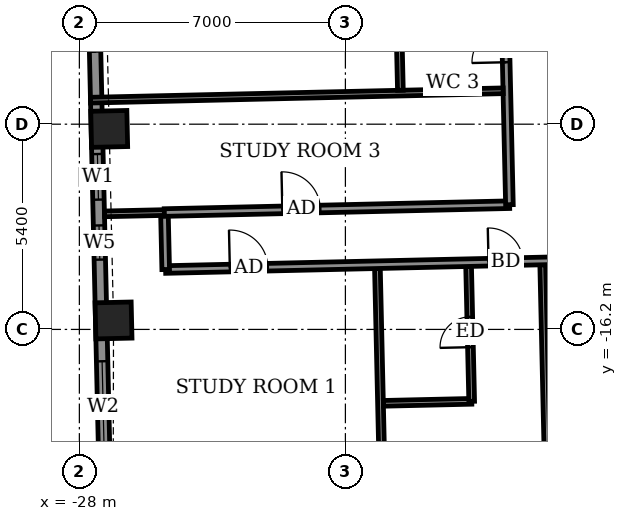
"""IFC4 building model, lengths in metres.
Left out: names, types, materials, properties, quantities, classifications, styles, units other than length and angle.
Written with IfcOpenShell. Run it as: python <this file> out.ifc"""

import sys

from ifc_helpers import new_model, si_unit, direction, frame, frame_2d, origin, origin_2d, place, context, subcontext, project, spatial, rectangle, extrude, element, fill, save


model = new_model("IFC4")
c1 = context("Model", 3, precision=1e-05, world=origin(), true_north=direction((0.0, 1.0)))
c2 = subcontext(c1, "Body", "Model", "MODEL_VIEW")
j1 = project(units=[si_unit("LENGTHUNIT", "METRE"), si_unit("PLANEANGLEUNIT", "RADIAN")], contexts=[c1])
p1 = place(None, origin())
s1 = spatial("IfcSite", under=j1, at=p1, CompositionType="ELEMENT")
p2 = place(p1, origin())
s2 = spatial("IfcBuilding", under=s1, at=p2, CompositionType="ELEMENT")
p3 = place(p2, frame((0.0, 0.0, 290.7)))
s3 = spatial("IfcBuildingStorey", under=s2, at=p3, CompositionType="ELEMENT", Elevation=290.7)
for number, where, z_axis, x_axis in (
    (1, (-27.215, -10.924, -0.55), (0.0, 0.0, 1.0), (0.023, -1.0, 0.0)),
    (2, (-27.101, -15.964, -0.55), (0.0, 0.0, 1.0), (0.023, -1.0, 0.0)),
):
    element("IfcColumn", number, at=place(p3, frame(where, z_axis=z_axis, x_axis=x_axis)), inside=s3, PredefinedType="COLUMN", context=c2, shape_type="SweptSolid", body=[
        extrude(rectangle(XDim=0.95, YDim=0.95, at=origin_2d()), origin(), (0.0, 0.0, 1.0), 3.6),
    ])
p4 = place(p3, frame((-27.665, -5.416, 0.0), z_axis=(0.0, 0.0, 1.0), x_axis=(0.022660024814, -0.999743228672, 0.0)))
e3 = element("IfcWall", 3, at=p4, inside=s3, PredefinedType="SOLIDWALL", context=c2, shape_type="SweptSolid", body=[
    extrude(rectangle(XDim=15.45, YDim=0.3, at=frame_2d((7.725, 0.0))), origin(), (0.0, 0.0, 1.0), 2.55),
])
p5 = place(p4, frame((1.975, 0.0, 0.0)))
e4 = element("IfcOpeningElement", 4, at=p5, cuts=e3, PredefinedType="OPENING", context=c2, shape_type="SweptSolid", body=[
    extrude(rectangle(XDim=1.5, YDim=2.4, at=frame_2d((0.75, 1.2))), frame((0.0, 0.16, 0.0), z_axis=(0.0, -1.0, 0.0), x_axis=(1.0, 0.0, 0.0)), (0.0, 0.0, 1.0), 0.32),
])
p6 = place(p4, frame((6.171, 0.0, 0.9)))
e5 = element("IfcOpeningElement", 5, at=p6, cuts=e3, PredefinedType="OPENING", context=c2, shape_type="SweptSolid", body=[
    extrude(rectangle(XDim=1.2, YDim=1.5, at=frame_2d((0.6, 0.75))), frame((0.0, 0.16, 0.0), z_axis=(0.0, -1.0, 0.0), x_axis=(1.0, 0.0, 0.0)), (0.0, 0.0, 1.0), 0.32),
])
p7 = place(p4, frame((8.05, 0.0, 0.9)))
e6 = element("IfcOpeningElement", 6, at=p7, cuts=e3, PredefinedType="OPENING", context=c2, shape_type="SweptSolid", body=[
    extrude(rectangle(XDim=0.9, YDim=1.5, at=frame_2d((0.45, 0.75))), frame((0.0, 0.16, 0.0), z_axis=(0.0, -1.0, 0.0), x_axis=(1.0, 0.0, 0.0)), (0.0, 0.0, 1.0), 0.32),
])
p8 = place(p4, frame((11.625, 0.0, 0.9)))
e7 = element("IfcOpeningElement", 7, at=p8, cuts=e3, PredefinedType="OPENING", context=c2, shape_type="SweptSolid", body=[
    extrude(rectangle(XDim=2.4, YDim=1.5, at=frame_2d((1.2, 0.75))), frame((0.0, 0.16, 0.0), z_axis=(0.0, -1.0, 0.0), x_axis=(1.0, 0.0, 0.0)), (0.0, 0.0, 1.0), 0.32),
])
p9 = place(p3, frame((-19.922, -24.945, 0.0), z_axis=(0.0, 0.0, 1.0), x_axis=(-0.022692470342, 0.99974249274, 0.0)))
e8 = element("IfcWall", 8, at=p9, inside=s3, PredefinedType="PARTITIONING", context=c2, shape_type="SweptSolid", body=[
    extrude(rectangle(XDim=10.35, YDim=0.15, at=frame_2d((5.175, 0.0))), origin(), (0.0, 0.0, 1.0), 2.55),
])
p10 = place(p3, frame((-15.573, -24.847, 0.0), z_axis=(0.0, 0.0, 1.0), x_axis=(-0.022714440015, 0.999741993824, 0.0)))
e9 = element("IfcWall", 9, at=p10, inside=s3, PredefinedType="PARTITIONING", context=c2, shape_type="SweptSolid", body=[
    extrude(rectangle(XDim=10.351, YDim=0.15, at=frame_2d((5.175, 0.0))), origin(), (0.0, 0.0, 1.0), 3.05),
])
p11 = place(p3, frame((-19.999, -18.145, 0.0), z_axis=(0.0, 0.0, 1.0), x_axis=(0.999740260747, 0.02279059109, 0.0)))
e10 = element("IfcWall", 10, at=p11, inside=s3, PredefinedType="PARTITIONING", context=c2, shape_type="SweptSolid", body=[
    extrude(rectangle(XDim=2.324, YDim=0.15, at=frame_2d((1.162, 0.0))), origin(), (0.0, 0.0, 1.0), 3.05),
])
p12 = place(p3, frame((-17.677, -18.092, 0.0), z_axis=(0.0, 0.0, 1.0), x_axis=(-0.022832321005, 0.999739308579, 0.0)))
e11 = element("IfcWall", 11, at=p12, inside=s3, PredefinedType="PARTITIONING", context=c2, shape_type="SweptSolid", body=[
    extrude(rectangle(XDim=3.55, YDim=0.15, at=frame_2d((1.775, 0.0))), origin(), (0.0, 0.0, 1.0), 3.05),
])
p13 = place(p12, frame((1.425, 0.0, 0.0)))
e12 = element("IfcOpeningElement", 12, at=p13, cuts=e11, PredefinedType="OPENING", context=c2, shape_type="SweptSolid", body=[
    extrude(rectangle(XDim=0.8, YDim=2.1, at=frame_2d((0.4, 1.05))), frame((0.0, 0.085, 0.0), z_axis=(0.0, -1.0, 0.0), x_axis=(1.0, 0.0, 0.0)), (0.0, 0.0, 1.0), 0.17),
])
p14 = place(p3, frame((-25.731, -14.624, 0.0), z_axis=(0.0, 0.0, 1.0), x_axis=(0.999742799525, 0.022678950563, 0.0)))
e13 = element("IfcWall", 13, at=p14, inside=s3, PredefinedType="PARTITIONING", context=c2, shape_type="SweptSolid", body=[
    extrude(rectangle(XDim=55.386, YDim=0.2, at=frame_2d((27.693, 0.0))), origin(), (0.0, 0.0, 1.0), 3.05),
])
p15 = place(p14, frame((1.691, 0.0, 0.0)))
e14 = element("IfcOpeningElement", 14, at=p15, cuts=e13, PredefinedType="OPENING", context=c2, shape_type="SweptSolid", body=[
    extrude(rectangle(XDim=1.0, YDim=2.1, at=frame_2d((0.5, 1.05))), frame((0.0, 0.11, 0.0), z_axis=(0.0, -1.0, 0.0), x_axis=(1.0, 0.0, 0.0)), (0.0, 0.0, 1.0), 0.22),
])
p16 = place(p14, frame((8.5, 0.0, 0.0)))
e15 = element("IfcOpeningElement", 15, at=p16, cuts=e13, PredefinedType="OPENING", context=c2, shape_type="SweptSolid", body=[
    extrude(rectangle(XDim=0.9, YDim=2.1, at=frame_2d((0.45, 1.05))), frame((0.0, 0.11, 0.0), z_axis=(0.0, -1.0, 0.0), x_axis=(1.0, 0.0, 0.0)), (0.0, 0.0, 1.0), 0.22),
])
p17 = place(p14, frame((10.5, 0.0, 0.0)))
e16 = element("IfcOpeningElement", 16, at=p17, cuts=e13, PredefinedType="OPENING", context=c2, shape_type="SweptSolid", body=[
    extrude(rectangle(XDim=0.9, YDim=2.1, at=frame_2d((0.45, 1.05))), frame((0.0, 0.11, 0.0), z_axis=(0.0, -1.0, 0.0), x_axis=(1.0, 0.0, 0.0)), (0.0, 0.0, 1.0), 0.22),
])
p18 = place(p14, frame((17.325, 0.0, 0.0)))
e17 = element("IfcOpeningElement", 17, at=p18, cuts=e13, PredefinedType="OPENING", context=c2, shape_type="SweptSolid", body=[
    extrude(rectangle(XDim=0.9, YDim=2.1, at=frame_2d((0.45, 1.05))), frame((0.0, 0.11, 0.0), z_axis=(0.0, -1.0, 0.0), x_axis=(1.0, 0.0, 0.0)), (0.0, 0.0, 1.0), 0.22),
])
p19 = place(p14, frame((19.375, 0.0, 0.0)))
e18 = element("IfcOpeningElement", 18, at=p19, cuts=e13, PredefinedType="OPENING", context=c2, shape_type="SweptSolid", body=[
    extrude(rectangle(XDim=0.9, YDim=2.1, at=frame_2d((0.45, 1.05))), frame((0.0, 0.11, 0.0), z_axis=(0.0, -1.0, 0.0), x_axis=(1.0, 0.0, 0.0)), (0.0, 0.0, 1.0), 0.22),
])
p20 = place(p14, frame((26.275, 0.0, 0.0)))
e19 = element("IfcOpeningElement", 19, at=p20, cuts=e13, PredefinedType="OPENING", context=c2, shape_type="SweptSolid", body=[
    extrude(rectangle(XDim=0.9, YDim=2.1, at=frame_2d((0.45, 1.05))), frame((0.0, 0.11, 0.0), z_axis=(0.0, -1.0, 0.0), x_axis=(1.0, 0.0, 0.0)), (0.0, 0.0, 1.0), 0.22),
])
p21 = place(p14, frame((28.425, 0.0, 0.0)))
e20 = element("IfcOpeningElement", 20, at=p21, cuts=e13, PredefinedType="OPENING", context=c2, shape_type="SweptSolid", body=[
    extrude(rectangle(XDim=0.9, YDim=2.1, at=frame_2d((0.45, 1.05))), frame((0.0, 0.11, 0.0), z_axis=(0.0, -1.0, 0.0), x_axis=(1.0, 0.0, 0.0)), (0.0, 0.0, 1.0), 0.22),
])
p22 = place(p14, frame((35.425, 0.0, 0.0)))
e21 = element("IfcOpeningElement", 21, at=p22, cuts=e13, PredefinedType="OPENING", context=c2, shape_type="SweptSolid", body=[
    extrude(rectangle(XDim=0.9, YDim=2.1, at=frame_2d((0.45, 1.05))), frame((0.0, 0.11, 0.0), z_axis=(0.0, -1.0, 0.0), x_axis=(1.0, 0.0, 0.0)), (0.0, 0.0, 1.0), 0.22),
])
p23 = place(p14, frame((37.625, 0.0, 0.0)))
e22 = element("IfcOpeningElement", 22, at=p23, cuts=e13, PredefinedType="OPENING", context=c2, shape_type="SweptSolid", body=[
    extrude(rectangle(XDim=0.9, YDim=2.1, at=frame_2d((0.45, 1.05))), frame((0.0, 0.11, 0.0), z_axis=(0.0, -1.0, 0.0), x_axis=(1.0, 0.0, 0.0)), (0.0, 0.0, 1.0), 0.22),
])
p24 = place(p14, frame((44.475, 0.0, 0.0)))
e23 = element("IfcOpeningElement", 23, at=p24, cuts=e13, PredefinedType="OPENING", context=c2, shape_type="SweptSolid", body=[
    extrude(rectangle(XDim=0.9, YDim=2.1, at=frame_2d((0.45, 1.05))), frame((0.0, 0.11, 0.0), z_axis=(0.0, -1.0, 0.0), x_axis=(1.0, 0.0, 0.0)), (0.0, 0.0, 1.0), 0.22),
])
p25 = place(p14, frame((52.268, 0.0, 0.0)))
e24 = element("IfcOpeningElement", 24, at=p25, cuts=e13, PredefinedType="OPENING", context=c2, shape_type="SweptSolid", body=[
    extrude(rectangle(XDim=1.0, YDim=2.1, at=frame_2d((0.5, 1.05))), frame((0.0, 0.11, 0.0), z_axis=(0.0, -1.0, 0.0), x_axis=(1.0, 0.0, 0.0)), (0.0, 0.0, 1.0), 0.22),
])
p26 = place(p14, frame((46.625, 0.0, 0.0)))
e25 = element("IfcOpeningElement", 25, at=p26, cuts=e13, PredefinedType="OPENING", context=c2, shape_type="SweptSolid", body=[
    extrude(rectangle(XDim=0.9, YDim=2.1, at=frame_2d((0.45, 1.05))), frame((0.0, 0.11, 0.0), z_axis=(0.0, -1.0, 0.0), x_axis=(1.0, 0.0, 0.0)), (0.0, 0.0, 1.0), 0.22),
])
p27 = place(p3, frame((-25.728, -14.624, 0.0), z_axis=(0.0, 0.0, 1.0), x_axis=(-0.022632637625, 0.99974384905, 0.0)))
e26 = element("IfcWall", 26, at=p27, inside=s3, PredefinedType="PARTITIONING", context=c2, shape_type="SweptSolid", body=[
    extrude(rectangle(XDim=1.5, YDim=0.2, at=frame_2d((0.75, 0.0))), origin(), (0.0, 0.0, 1.0), 3.05),
])
p28 = place(p3, frame((-27.339, -13.16, 0.0), z_axis=(0.0, 0.0, 1.0), x_axis=(0.999755386732, 0.022117113289, 0.0)))
e27 = element("IfcWall", 27, at=p28, inside=s3, PredefinedType="PARTITIONING", context=c2, shape_type="SweptSolid", body=[
    extrude(rectangle(XDim=1.579, YDim=0.15, at=frame_2d((0.789, 0.0))), origin(), (0.0, 0.0, 1.0), 2.55),
])
p29 = place(p3, frame((-25.765, -13.125, 0.0), z_axis=(0.0, 0.0, 1.0), x_axis=(0.999740502457, 0.022779985654, 0.0)))
e28 = element("IfcWall", 28, at=p29, inside=s3, PredefinedType="PARTITIONING", context=c2, shape_type="SweptSolid", body=[
    extrude(rectangle(XDim=9.088, YDim=0.2, at=frame_2d((4.544, 0.0))), origin(), (0.0, 0.0, 1.0), 3.05),
])
p30 = place(p29, frame((3.107, 0.0, 0.0)))
e29 = element("IfcOpeningElement", 29, at=p30, cuts=e28, PredefinedType="OPENING", context=c2, shape_type="SweptSolid", body=[
    extrude(rectangle(XDim=1.0, YDim=2.1, at=frame_2d((0.5, 1.05))), frame((0.0, 0.11, 0.0), z_axis=(0.0, -1.0, 0.0), x_axis=(1.0, 0.0, 0.0)), (0.0, 0.0, 1.0), 0.22),
])
p31 = place(p3, frame((-16.684, -12.919, 0.0), z_axis=(0.0, 0.0, 1.0), x_axis=(-0.022712214871, 0.999742044377, 0.0)))
e30 = element("IfcWall", 30, at=p31, inside=s3, PredefinedType="PARTITIONING", context=c2, shape_type="SweptSolid", body=[
    extrude(rectangle(XDim=26.551, YDim=0.2, at=frame_2d((13.275, 0.0))), origin(), (0.0, 0.0, 1.0), 3.05),
])
p32 = place(p31, frame((24.588, 0.0, 0.0)))
e31 = element("IfcOpeningElement", 31, at=p32, cuts=e30, PredefinedType="OPENING", context=c2, shape_type="SweptSolid", body=[
    extrude(rectangle(XDim=1.0, YDim=2.1, at=frame_2d((0.5, 1.05))), frame((0.0, 0.11, 0.0), z_axis=(0.0, -1.0, 0.0), x_axis=(1.0, 0.0, 0.0)), (0.0, 0.0, 1.0), 0.22),
])
p33 = place(p31, frame((21.875, 0.0, 0.0)))
e32 = element("IfcOpeningElement", 32, at=p33, cuts=e30, PredefinedType="OPENING", context=c2, shape_type="SweptSolid", body=[
    extrude(rectangle(XDim=0.9, YDim=2.1, at=frame_2d((0.45, 1.05))), frame((0.0, 0.11, 0.0), z_axis=(0.0, -1.0, 0.0), x_axis=(1.0, 0.0, 0.0)), (0.0, 0.0, 1.0), 0.22),
])
p34 = place(p31, frame((17.05, 0.0, 0.0)))
e33 = element("IfcOpeningElement", 33, at=p34, cuts=e30, PredefinedType="OPENING", context=c2, shape_type="SweptSolid", body=[
    extrude(rectangle(XDim=1.0, YDim=2.1, at=frame_2d((0.5, 1.05))), frame((0.0, 0.11, 0.0), z_axis=(0.0, -1.0, 0.0), x_axis=(1.0, 0.0, 0.0)), (0.0, 0.0, 1.0), 0.22),
])
p35 = place(p31, frame((19.375, 0.0, 0.0)))
e34 = element("IfcOpeningElement", 34, at=p35, cuts=e30, PredefinedType="OPENING", context=c2, shape_type="SweptSolid", body=[
    extrude(rectangle(XDim=0.9, YDim=2.1, at=frame_2d((0.45, 1.05))), frame((0.0, 0.11, 0.0), z_axis=(0.0, -1.0, 0.0), x_axis=(1.0, 0.0, 0.0)), (0.0, 0.0, 1.0), 0.22),
])
p36 = place(p31, frame((14.925, 0.0, 0.0)))
e35 = element("IfcOpeningElement", 35, at=p36, cuts=e30, PredefinedType="OPENING", context=c2, shape_type="SweptSolid", body=[
    extrude(rectangle(XDim=1.0, YDim=2.1, at=frame_2d((0.5, 1.05))), frame((0.0, 0.11, 0.0), z_axis=(0.0, -1.0, 0.0), x_axis=(1.0, 0.0, 0.0)), (0.0, 0.0, 1.0), 0.22),
])
p37 = place(p31, frame((12.725, 0.0, 0.0)))
e36 = element("IfcOpeningElement", 36, at=p37, cuts=e30, PredefinedType="OPENING", context=c2, shape_type="SweptSolid", body=[
    extrude(rectangle(XDim=0.9, YDim=2.1, at=frame_2d((0.45, 1.05))), frame((0.0, 0.11, 0.0), z_axis=(0.0, -1.0, 0.0), x_axis=(1.0, 0.0, 0.0)), (0.0, 0.0, 1.0), 0.22),
])
p38 = place(p31, frame((10.325, 0.0, 0.0)))
e37 = element("IfcOpeningElement", 37, at=p38, cuts=e30, PredefinedType="OPENING", context=c2, shape_type="SweptSolid", body=[
    extrude(rectangle(XDim=1.0, YDim=2.1, at=frame_2d((0.5, 1.05))), frame((0.0, 0.11, 0.0), z_axis=(0.0, -1.0, 0.0), x_axis=(1.0, 0.0, 0.0)), (0.0, 0.0, 1.0), 0.22),
])
p39 = place(p31, frame((8.025, 0.0, 0.0)))
e38 = element("IfcOpeningElement", 38, at=p39, cuts=e30, PredefinedType="OPENING", context=c2, shape_type="SweptSolid", body=[
    extrude(rectangle(XDim=0.9, YDim=2.1, at=frame_2d((0.45, 1.05))), frame((0.0, 0.11, 0.0), z_axis=(0.0, -1.0, 0.0), x_axis=(1.0, 0.0, 0.0)), (0.0, 0.0, 1.0), 0.22),
])
p40 = place(p31, frame((5.837, 0.0, 0.0)))
e39 = element("IfcOpeningElement", 39, at=p40, cuts=e30, PredefinedType="OPENING", context=c2, shape_type="SweptSolid", body=[
    extrude(rectangle(XDim=1.0, YDim=2.1, at=frame_2d((0.5, 1.05))), frame((0.0, 0.11, 0.0), z_axis=(0.0, -1.0, 0.0), x_axis=(1.0, 0.0, 0.0)), (0.0, 0.0, 1.0), 0.22),
])
p41 = place(p31, frame((3.75, 0.0, 0.0)))
e40 = element("IfcOpeningElement", 40, at=p41, cuts=e30, PredefinedType="OPENING", context=c2, shape_type="SweptSolid", body=[
    extrude(rectangle(XDim=0.9, YDim=2.1, at=frame_2d((0.45, 1.05))), frame((0.0, 0.11, 0.0), z_axis=(0.0, -1.0, 0.0), x_axis=(1.0, 0.0, 0.0)), (0.0, 0.0, 1.0), 0.22),
])
p42 = place(p3, frame((-27.707, -10.168, 0.0), z_axis=(0.0, 0.0, 1.0), x_axis=(0.999741313154, 0.022744378952, 0.0)))
e41 = element("IfcWall", 41, at=p42, inside=s3, PredefinedType="PARTITIONING", context=c2, shape_type="SweptSolid", body=[
    extrude(rectangle(XDim=10.863, YDim=0.15, at=frame_2d((5.432, 0.0))), origin(), (0.0, 0.0, 1.0), 2.55),
])
p43 = place(p3, frame((-19.553, -9.908, 0.0), z_axis=(0.0, 0.0, 1.0), x_axis=(-0.022781023197, 0.999740478815, 0.0)))
e42 = element("IfcWall", 42, at=p43, inside=s3, PredefinedType="PARTITIONING", context=c2, shape_type="SweptSolid", body=[
    extrude(rectangle(XDim=2.325, YDim=0.15, at=frame_2d((1.163, 0.0))), origin(), (0.0, 0.0, 1.0), 3.05),
])
p44 = place(p6, origin())
e43 = element("IfcWindow", 43, at=p44, inside=s3, PartitioningType="SINGLE_PANEL", PredefinedType="WINDOW", context=c2, shape_type="SweptSolid", body=[
    extrude(rectangle(XDim=1.2, YDim=1.5, at=frame_2d((0.6, 0.75))), frame((0.0, 0.03, 0.0), z_axis=(0.0, -1.0, 0.0), x_axis=(1.0, 0.0, 0.0)), (0.0, 0.0, 1.0), 0.06),
])
fill(e5, e43)
p45 = place(p7, origin())
e44 = element("IfcWindow", 44, at=p45, inside=s3, PartitioningType="SINGLE_PANEL", PredefinedType="WINDOW", context=c2, shape_type="SweptSolid", body=[
    extrude(rectangle(XDim=0.9, YDim=1.5, at=frame_2d((0.45, 0.75))), frame((0.0, 0.03, 0.0), z_axis=(0.0, -1.0, 0.0), x_axis=(1.0, 0.0, 0.0)), (0.0, 0.0, 1.0), 0.06),
])
fill(e6, e44)
p46 = place(p8, origin())
e45 = element("IfcWindow", 45, at=p46, inside=s3, PartitioningType="DOUBLE_PANEL_VERTICAL", PredefinedType="WINDOW", context=c2, shape_type="SweptSolid", body=[
    extrude(rectangle(XDim=2.4, YDim=1.5, at=frame_2d((1.2, 0.75))), frame((0.0, 0.03, 0.0), z_axis=(0.0, -1.0, 0.0), x_axis=(1.0, 0.0, 0.0)), (0.0, 0.0, 1.0), 0.06),
])
fill(e7, e45)
p47 = place(p15, origin())
e46 = element("IfcDoor", 46, at=p47, inside=s3, OperationType="SINGLE_SWING_LEFT", PredefinedType="DOOR", context=c2, shape_type="SweptSolid", body=[
    extrude(rectangle(XDim=1.0, YDim=2.1, at=frame_2d((0.5, 1.05))), frame((0.0, 0.025, 0.0), z_axis=(0.0, -1.0, 0.0), x_axis=(1.0, 0.0, 0.0)), (0.0, 0.0, 1.0), 0.05),
])
fill(e14, e46)
p48 = place(p16, origin())
e47 = element("IfcDoor", 47, at=p48, inside=s3, OperationType="SINGLE_SWING_LEFT", PredefinedType="DOOR", context=c2, shape_type="SweptSolid", body=[
    extrude(rectangle(XDim=0.9, YDim=2.1, at=frame_2d((0.45, 1.05))), frame((0.0, 0.025, 0.0), z_axis=(0.0, -1.0, 0.0), x_axis=(1.0, 0.0, 0.0)), (0.0, 0.0, 1.0), 0.05),
])
fill(e15, e47)
p49 = place(p13, origin())
e48 = element("IfcDoor", 48, at=p49, inside=s3, OperationType="SINGLE_SWING_LEFT", PredefinedType="DOOR", context=c2, shape_type="SweptSolid", body=[
    extrude(rectangle(XDim=0.8, YDim=2.1, at=frame_2d((0.4, 1.05))), frame((0.0, 0.025, 0.0), z_axis=(0.0, -1.0, 0.0), x_axis=(1.0, 0.0, 0.0)), (0.0, 0.0, 1.0), 0.05),
])
fill(e12, e48)
p50 = place(p41, origin())
e49 = element("IfcDoor", 49, at=p50, inside=s3, OperationType="SINGLE_SWING_LEFT", PredefinedType="DOOR", context=c2, shape_type="SweptSolid", body=[
    extrude(rectangle(XDim=0.9, YDim=2.1, at=frame_2d((0.45, 1.05))), frame((0.0, 0.025, 0.0), z_axis=(0.0, -1.0, 0.0), x_axis=(1.0, 0.0, 0.0)), (0.0, 0.0, 1.0), 0.05),
])
fill(e40, e49)
p51 = place(p30, origin())
e50 = element("IfcDoor", 50, at=p51, inside=s3, OperationType="SINGLE_SWING_RIGHT", PredefinedType="DOOR", context=c2, shape_type="SweptSolid", body=[
    extrude(rectangle(XDim=1.0, YDim=2.1, at=frame_2d((0.5, 1.05))), frame((0.0, 0.025, 0.0), z_axis=(0.0, -1.0, 0.0), x_axis=(1.0, 0.0, 0.0)), (0.0, 0.0, 1.0), 0.05),
])
fill(e29, e50)
save(model, sys.argv[1])
